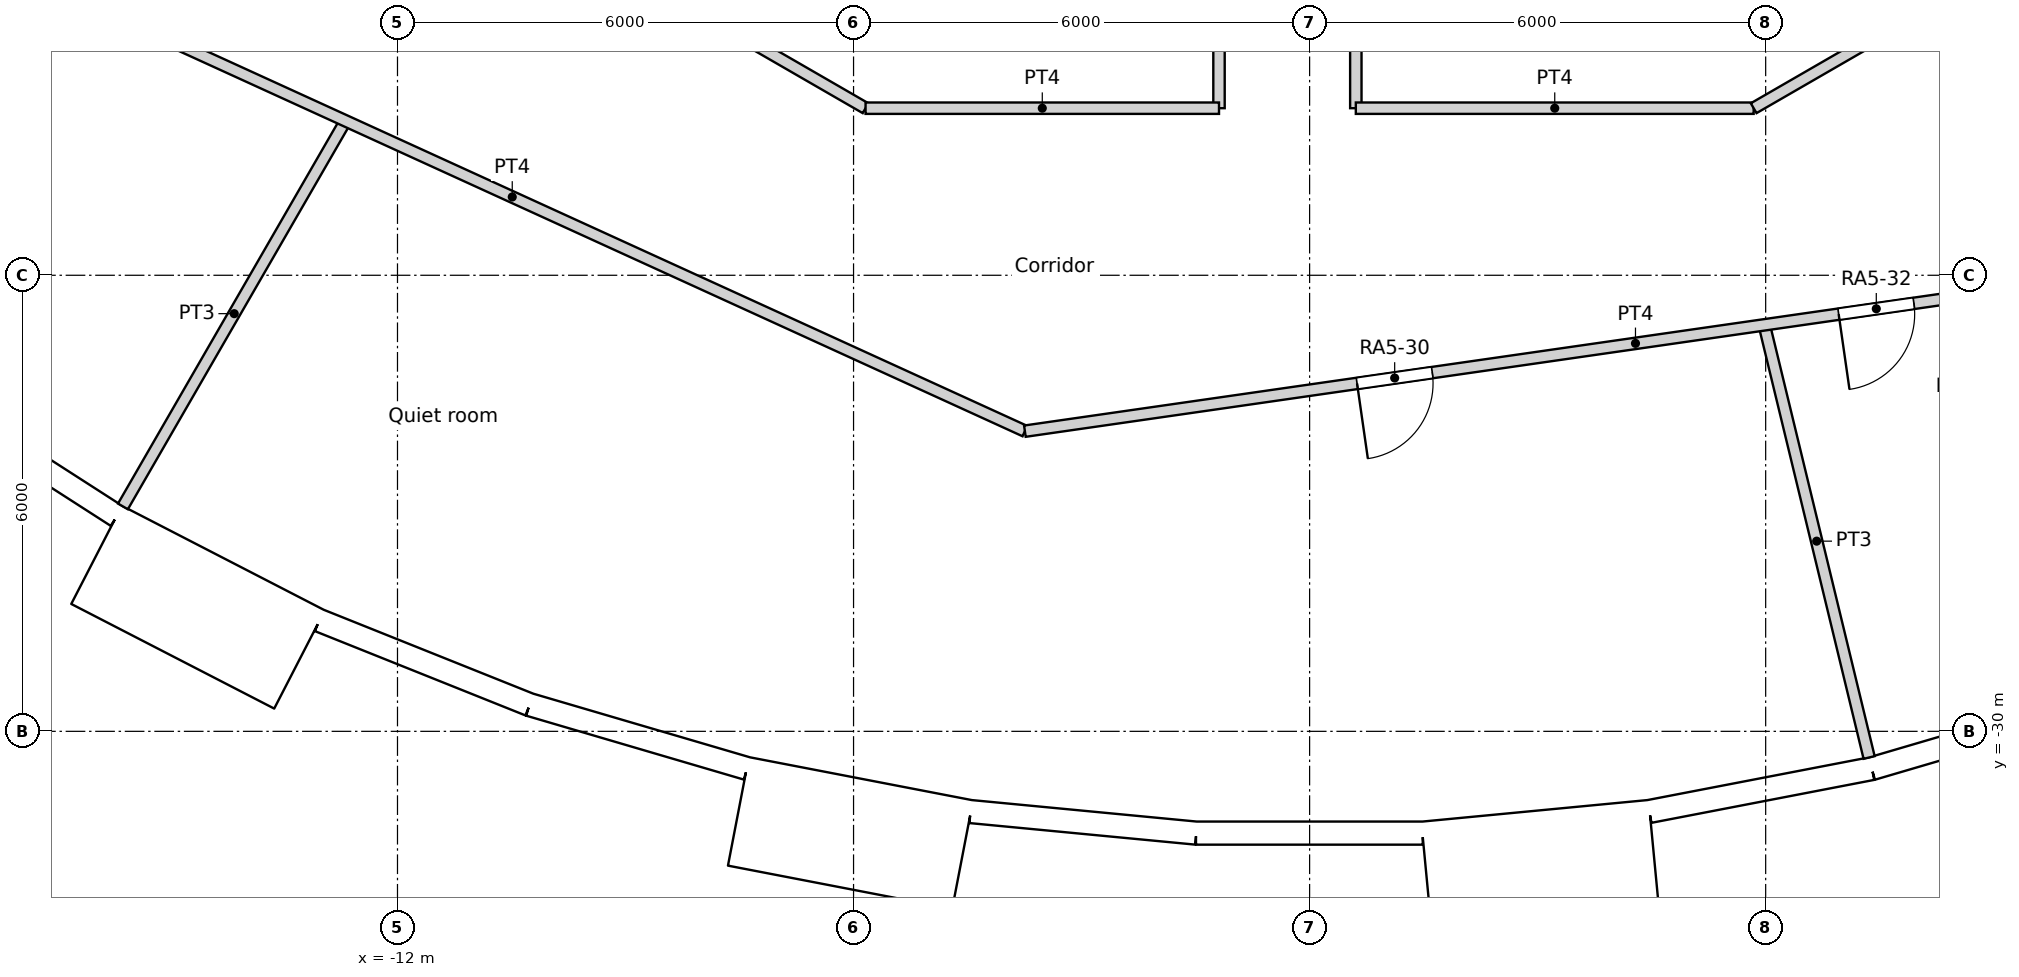
"""IFC4 building model, lengths in metres.
Left out: names, types, materials, properties, quantities, classifications, styles, units other than length and angle.
Written with IfcOpenShell. Run it as: python <this file> out.ifc"""

import sys

from ifc_helpers import new_model, si_unit, direction, frame, frame_2d, origin, origin_2d, place, context, subcontext, project, spatial, rectangle, circle, extrude, element, fill, save


model = new_model("IFC4")
c1 = context("Model", 3, precision=1e-05, world=origin(), true_north=direction((0.0, 1.0)))
c2 = subcontext(c1, "Body", "Model", "MODEL_VIEW")
j1 = project(units=[si_unit("LENGTHUNIT", "METRE"), si_unit("PLANEANGLEUNIT", "RADIAN")], contexts=[c1])
p1 = place(None, origin())
s1 = spatial("IfcSite", under=j1, at=p1, CompositionType="ELEMENT")
p2 = place(p1, origin())
s2 = spatial("IfcBuilding", under=s1, at=p2, CompositionType="ELEMENT")
p3 = place(p2, frame((0.0, 0.0, 71.4)))
s3 = spatial("IfcBuildingStorey", under=s2, at=p3, CompositionType="ELEMENT", Elevation=71.4)
for number, where, z_axis, x_axis in (
    (1, (-15.137, -26.219, 0.0), (0.0, 0.0, 1.0), (1.0, 0.0, 0.0)),
    (2, (-9.902, -28.61, 0.0), (0.0, 0.0, 1.0), (1.0, 0.0, 0.0)),
    (3, (-4.309, -29.966, 0.0), (0.0, 0.0, 1.0), (1.0, 0.0, 0.0)),
    (4, (1.44, -30.24, 0.0), (0.0, 0.0, 1.0), (1.0, 0.0, 0.0)),
    (5, (7.137, -29.421, 0.0), (0.0, 0.0, 1.0), (1.0, 0.0, 0.0)),
):
    element("IfcColumn", number, at=place(p3, frame(where, z_axis=z_axis, x_axis=x_axis)), inside=s3, PredefinedType="COLUMN", context=c2, shape_type="SweptSolid", body=[
        extrude(circle(Radius=0.6, at=origin_2d()), origin(), (0.0, 0.0, 1.0), 3.6),
    ])
for number, where, z_axis, x_axis in (
    (6, (-12.274, -21.259, 0.0), (0.0, 0.0, 1.0), (1.0, 0.0, 0.0)),
    (7, (-7.04, -23.516, 0.0), (0.0, 0.0, 1.0), (1.0, 0.0, 0.0)),
    (8, (-1.427, -24.506, 0.0), (0.0, 0.0, 1.0), (1.0, 0.0, 0.0)),
    (9, (4.263, -24.175, 0.0), (0.0, 0.0, 1.0), (1.0, 0.0, 0.0)),
):
    element("IfcColumn", number, at=place(p3, frame(where, z_axis=z_axis, x_axis=x_axis)), inside=s3, PredefinedType="COLUMN", context=c2, shape_type="SweptSolid", body=[
        extrude(circle(Radius=0.65, at=origin_2d()), origin(), (0.0, 0.0, 1.0), 3.6),
    ])
p4 = place(p3, frame((-18.199, -25.557, 0.0), z_axis=(0.0, 0.0, 1.0), x_axis=(0.841260995538, -0.54062920508, 0.0)))
e10 = element("IfcWall", 10, at=p4, inside=s3, PredefinedType="SOLIDWALL", context=c2, shape_type="SweptSolid", body=[
    extrude(rectangle(XDim=2.979, YDim=0.3, at=frame_2d((1.49, 0.0))), origin(), (0.0, 0.0, 1.0), 3.15),
])
p5 = place(p4, frame((1.49, 0.0, 1.55)))
e11 = element("IfcOpeningElement", 11, at=p5, cuts=e10, PredefinedType="OPENING", context=c2, shape_type="SweptSolid", body=[
    extrude(circle(Radius=0.9, at=origin_2d()), frame((0.0, 0.16, 0.0), z_axis=(0.0, -1.0, 0.0), x_axis=(1.0, 0.0, 0.0)), (0.0, 0.0, 1.0), 0.32),
])
p6 = place(p3, frame((-15.957, -27.679, -0.45), z_axis=(0.0, 0.0, 1.0), x_axis=(0.888858064689, -0.458182650083, 0.0)))
e12 = element("IfcWall", 12, at=p6, inside=s3, PredefinedType="ELEMENTEDWALL", context=c2, shape_type="SweptSolid", body=[
    extrude(rectangle(XDim=3.0, YDim=1.45, at=frame_2d((1.5, 0.0))), origin(), (0.0, 0.0, 1.0), 3.6),
])
p7 = place(p6, frame((1.5, 0.0, 2.0)))
e13 = element("IfcOpeningElement", 13, at=p7, cuts=e12, PredefinedType="OPENING", context=c2, shape_type="SweptSolid", body=[
    extrude(circle(Radius=0.9, at=origin_2d()), frame((0.0, 0.735, 0.0), z_axis=(0.0, -1.0, 0.0), x_axis=(1.0, 0.0, 0.0)), (0.0, 0.0, 1.0), 1.47),
])
p8 = place(p3, frame((-13.028, -28.542, 0.0), z_axis=(0.0, 0.0, 1.0), x_axis=(0.928374947, -0.371644935098, 0.0)))
e14 = element("IfcWall", 14, at=p8, inside=s3, PredefinedType="SOLIDWALL", context=c2, shape_type="SweptSolid", body=[
    extrude(rectangle(XDim=2.98, YDim=0.3, at=frame_2d((1.49, 0.0))), origin(), (0.0, 0.0, 1.0), 3.15),
])
p9 = place(p8, frame((1.49, 0.0, 1.55)))
e15 = element("IfcOpeningElement", 15, at=p9, cuts=e14, PredefinedType="OPENING", context=c2, shape_type="SweptSolid", body=[
    extrude(circle(Radius=0.9, at=origin_2d()), frame((0.0, 0.16, 0.0), z_axis=(0.0, -1.0, 0.0), x_axis=(1.0, 0.0, 0.0)), (0.0, 0.0, 1.0), 0.32),
])
p10 = place(p3, frame((-10.261, -29.649, 0.0), z_axis=(0.0, 0.0, 1.0), x_axis=(0.959501085144, -0.281704930036, 0.0)))
e16 = element("IfcWall", 16, at=p10, inside=s3, PredefinedType="SOLIDWALL", context=c2, shape_type="SweptSolid", body=[
    extrude(rectangle(XDim=2.979, YDim=0.3, at=frame_2d((1.49, 0.0))), origin(), (0.0, 0.0, 1.0), 3.15),
])
p11 = place(p10, frame((1.49, 0.0, 1.55)))
e17 = element("IfcOpeningElement", 17, at=p11, cuts=e16, PredefinedType="OPENING", context=c2, shape_type="SweptSolid", body=[
    extrude(circle(Radius=0.9, at=origin_2d()), frame((0.0, 0.16, 0.0), z_axis=(0.0, -1.0, 0.0), x_axis=(1.0, 0.0, 0.0)), (0.0, 0.0, 1.0), 0.32),
])
p12 = place(p3, frame((-7.513, -31.053, -0.45), z_axis=(0.0, 0.0, 1.0), x_axis=(0.981921602273, -0.189288052949, 0.0)))
e18 = element("IfcWall", 18, at=p12, inside=s3, PredefinedType="ELEMENTEDWALL", context=c2, shape_type="SweptSolid", body=[
    extrude(rectangle(XDim=3.0, YDim=1.45, at=frame_2d((1.5, 0.0))), origin(), (0.0, 0.0, 1.0), 3.6),
])
p13 = place(p12, frame((1.5, 0.0, 2.0)))
e19 = element("IfcOpeningElement", 19, at=p13, cuts=e18, PredefinedType="OPENING", context=c2, shape_type="SweptSolid", body=[
    extrude(circle(Radius=0.9, at=origin_2d()), frame((0.0, 0.735, 0.0), z_axis=(0.0, -1.0, 0.0), x_axis=(1.0, 0.0, 0.0)), (0.0, 0.0, 1.0), 1.47),
])
p14 = place(p3, frame((-4.459, -31.056, 0.0), z_axis=(0.0, 0.0, 1.0), x_axis=(0.995472611385, -0.095048829468, 0.0)))
e20 = element("IfcWall", 20, at=p14, inside=s3, PredefinedType="SOLIDWALL", context=c2, shape_type="SweptSolid", body=[
    extrude(rectangle(XDim=2.979, YDim=0.3, at=frame_2d((1.49, 0.0))), origin(), (0.0, 0.0, 1.0), 3.15),
])
p15 = place(p14, frame((1.49, 0.0, 1.55)))
e21 = element("IfcOpeningElement", 21, at=p15, cuts=e20, PredefinedType="OPENING", context=c2, shape_type="SweptSolid", body=[
    extrude(circle(Radius=0.9, at=origin_2d()), frame((0.0, 0.16, 0.0), z_axis=(0.0, -1.0, 0.0), x_axis=(1.0, 0.0, 0.0)), (0.0, 0.0, 1.0), 0.32),
])
p16 = place(p3, frame((-1.493, -31.339, 0.0), z_axis=(0.0, 0.0, 1.0), x_axis=(1.0, 0.0, 0.0)))
e22 = element("IfcWall", 22, at=p16, inside=s3, PredefinedType="SOLIDWALL", context=c2, shape_type="SweptSolid", body=[
    extrude(rectangle(XDim=2.98, YDim=0.3, at=frame_2d((1.49, 0.0))), origin(), (0.0, 0.0, 1.0), 3.15),
])
p17 = place(p16, frame((1.49, 0.0, 1.55)))
e23 = element("IfcOpeningElement", 23, at=p17, cuts=e22, PredefinedType="OPENING", context=c2, shape_type="SweptSolid", body=[
    extrude(circle(Radius=0.9, at=origin_2d()), frame((0.0, 0.16, 0.0), z_axis=(0.0, -1.0, 0.0), x_axis=(1.0, 0.0, 0.0)), (0.0, 0.0, 1.0), 0.32),
])
p18 = place(p3, frame((1.54, -31.912, -0.45), z_axis=(0.0, 0.0, 1.0), x_axis=(0.995472768558, 0.09504718333, 0.0)))
e24 = element("IfcWall", 24, at=p18, inside=s3, PredefinedType="ELEMENTEDWALL", context=c2, shape_type="SweptSolid", body=[
    extrude(rectangle(XDim=3.0, YDim=1.45, at=frame_2d((1.5, 0.0))), origin(), (0.0, 0.0, 1.0), 3.6),
])
p19 = place(p18, frame((1.5, 0.0, 2.0)))
e25 = element("IfcOpeningElement", 25, at=p19, cuts=e24, PredefinedType="OPENING", context=c2, shape_type="SweptSolid", body=[
    extrude(circle(Radius=0.9, at=origin_2d()), frame((0.0, 0.735, 0.0), z_axis=(0.0, -1.0, 0.0), x_axis=(1.0, 0.0, 0.0)), (0.0, 0.0, 1.0), 1.47),
])
p20 = place(p3, frame((4.471, -31.054, 0.0), z_axis=(0.0, 0.0, 1.0), x_axis=(0.981924535406, 0.189272836848, 0.0)))
e26 = element("IfcWall", 26, at=p20, inside=s3, PredefinedType="SOLIDWALL", context=c2, shape_type="SweptSolid", body=[
    extrude(rectangle(XDim=2.98, YDim=0.3, at=frame_2d((1.49, 0.0))), origin(), (0.0, 0.0, 1.0), 3.15),
])
p21 = place(p20, frame((1.49, 0.0, 1.55)))
e27 = element("IfcOpeningElement", 27, at=p21, cuts=e26, PredefinedType="OPENING", context=c2, shape_type="SweptSolid", body=[
    extrude(circle(Radius=0.9, at=origin_2d()), frame((0.0, 0.16, 0.0), z_axis=(0.0, -1.0, 0.0), x_axis=(1.0, 0.0, 0.0)), (0.0, 0.0, 1.0), 0.32),
])
p22 = place(p3, frame((7.397, -30.49, 0.0), z_axis=(0.0, 0.0, 1.0), x_axis=(0.959507586834, 0.28168278401, 0.0)))
e28 = element("IfcWall", 28, at=p22, inside=s3, PredefinedType="SOLIDWALL", context=c2, shape_type="SweptSolid", body=[
    extrude(rectangle(XDim=2.98, YDim=0.3, at=frame_2d((1.49, 0.0))), origin(), (0.0, 0.0, 1.0), 3.15),
])
p23 = place(p22, frame((1.49, 0.0, 1.55)))
e29 = element("IfcOpeningElement", 29, at=p23, cuts=e28, PredefinedType="OPENING", context=c2, shape_type="SweptSolid", body=[
    extrude(circle(Radius=0.9, at=origin_2d()), frame((0.0, 0.16, 0.0), z_axis=(0.0, -1.0, 0.0), x_axis=(1.0, 0.0, 0.0)), (0.0, 0.0, 1.0), 0.32),
])
p24 = place(p3, frame((-14.0, -17.092, 0.0), z_axis=(0.0, 0.0, 1.0), x_axis=(0.86602719091, -0.499996904595, 0.0)))
e30 = element("IfcWall", 30, at=p24, inside=s3, PredefinedType="PARTITIONING", context=c2, shape_type="SweptSolid", body=[
    extrude(rectangle(XDim=9.42, YDim=0.15, at=frame_2d((4.71, 0.0))), origin(), (0.0, 0.0, 1.0), 3.15),
])
p25 = place(p3, frame((-5.842, -21.802, 0.0), z_axis=(0.0, 0.0, 1.0), x_axis=(1.0, 0.0, 0.0)))
e31 = element("IfcWall", 31, at=p25, inside=s3, PredefinedType="PARTITIONING", context=c2, shape_type="SweptSolid", body=[
    extrude(rectangle(XDim=4.65, YDim=0.15, at=frame_2d((2.325, 0.0))), origin(), (0.0, 0.0, 1.0), 3.15),
])
p26 = place(p3, frame((-1.192, -21.802, 0.0), z_axis=(0.0, 0.0, 1.0), x_axis=(0.0, 1.0, 0.0)))
e32 = element("IfcWall", 32, at=p26, inside=s3, PredefinedType="PARTITIONING", context=c2, shape_type="SweptSolid", body=[
    extrude(rectangle(XDim=10.002, YDim=0.15, at=frame_2d((5.001, 0.0))), origin(), (0.0, 0.0, 1.0), 3.15),
])
p27 = place(p3, frame((0.608, -21.802, 0.0), z_axis=(0.0, 0.0, 1.0), x_axis=(0.0, 1.0, 0.0)))
e33 = element("IfcWall", 33, at=p27, inside=s3, PredefinedType="PARTITIONING", context=c2, shape_type="SweptSolid", body=[
    extrude(rectangle(XDim=10.002, YDim=0.15, at=frame_2d((5.001, 0.0))), origin(), (0.0, 0.0, 1.0), 3.15),
])
p28 = place(p27, frame((4.526, 0.0, 0.0)))
e34 = element("IfcOpeningElement", 34, at=p28, cuts=e33, PredefinedType="OPENING", context=c2, shape_type="SweptSolid", body=[
    extrude(rectangle(XDim=0.95, YDim=2.1, at=frame_2d((0.475, 1.05))), frame((0.0, 0.075, 0.0), z_axis=(0.0, -1.0, 0.0), x_axis=(1.0, 0.0, 0.0)), (0.0, 0.0, 1.0), 0.15),
])
p29 = place(p3, frame((0.608, -21.802, 0.0), z_axis=(0.0, 0.0, 1.0), x_axis=(1.0, 0.0, 0.0)))
e35 = element("IfcWall", 35, at=p29, inside=s3, PredefinedType="PARTITIONING", context=c2, shape_type="SweptSolid", body=[
    extrude(rectangle(XDim=5.234, YDim=0.15, at=frame_2d((2.617, 0.0))), origin(), (0.0, 0.0, 1.0), 3.15),
])
p30 = place(p3, frame((5.842, -21.802, 0.0), z_axis=(0.0, 0.0, 1.0), x_axis=(0.865983505205, 0.500072563448, 0.0)))
e36 = element("IfcWall", 36, at=p30, inside=s3, PredefinedType="PARTITIONING", context=c2, shape_type="SweptSolid", body=[
    extrude(rectangle(XDim=4.265, YDim=0.15, at=frame_2d((2.133, 0.0))), origin(), (0.0, 0.0, 1.0), 3.15),
])
p31 = place(p3, frame((-17.235, -19.89, 0.0), z_axis=(0.0, 0.0, 1.0), x_axis=(0.909645678785, -0.415385049163, 0.0)))
e37 = element("IfcWall", 37, at=p31, inside=s3, PredefinedType="PARTITIONING", context=c2, shape_type="SweptSolid", body=[
    extrude(rectangle(XDim=14.829, YDim=0.15, at=frame_2d((7.415, 0.0))), origin(), (0.0, 0.0, 1.0), 3.15),
])
p32 = place(p3, frame((-3.746, -26.051, 0.0), z_axis=(0.0, 0.0, 1.0), x_axis=(0.989823328782, 0.142301713967, 0.0)))
e38 = element("IfcWall", 38, at=p32, inside=s3, PredefinedType="PARTITIONING", context=c2, shape_type="SweptSolid", body=[
    extrude(rectangle(XDim=14.83, YDim=0.15, at=frame_2d((7.415, 0.0))), origin(), (0.0, 0.0, 1.0), 3.15),
])
p33 = place(p32, frame((4.415, 0.0, 0.0)))
e39 = element("IfcOpeningElement", 39, at=p33, cuts=e38, PredefinedType="OPENING", context=c2, shape_type="SweptSolid", body=[
    extrude(rectangle(XDim=1.0, YDim=2.04, at=frame_2d((0.5, 1.02))), frame((0.0, 0.075, 0.0), z_axis=(0.0, -1.0, 0.0), x_axis=(1.0, 0.0, 0.0)), (0.0, 0.0, 1.0), 0.15),
])
p34 = place(p32, frame((10.816, 0.0, 0.0)))
e40 = element("IfcOpeningElement", 40, at=p34, cuts=e38, PredefinedType="OPENING", context=c2, shape_type="SweptSolid", body=[
    extrude(rectangle(XDim=1.0, YDim=2.1, at=frame_2d((0.5, 1.05))), frame((0.0, 0.075, 0.0), z_axis=(0.0, -1.0, 0.0), x_axis=(1.0, 0.0, 0.0)), (0.0, 0.0, 1.0), 0.15),
])
p35 = place(p3, frame((-15.612, -27.041, 0.0), z_axis=(0.0, 0.0, 1.0), x_axis=(0.499954606878, 0.86605160993, 0.0)))
e41 = element("IfcWall", 41, at=p35, inside=s3, PredefinedType="PARTITIONING", context=c2, shape_type="SweptSolid", body=[
    extrude(rectangle(XDim=5.856, YDim=0.15, at=frame_2d((2.928, 0.0))), origin(), (0.0, 0.0, 1.0), 3.15),
])
p36 = place(p3, frame((5.981, -24.652, 0.0), z_axis=(0.0, 0.0, 1.0), x_axis=(0.235644168604, -0.971839403298, 0.0)))
e42 = element("IfcWall", 42, at=p36, inside=s3, PredefinedType="PARTITIONING", context=c2, shape_type="SweptSolid", body=[
    extrude(rectangle(XDim=5.857, YDim=0.15, at=frame_2d((2.928, 0.0))), origin(), (0.0, 0.0, 1.0), 3.15),
])
p37 = place(p5, origin())
e43 = element("IfcWindow", 43, at=p37, inside=s3, PartitioningType="SINGLE_PANEL", PredefinedType="WINDOW", context=c2, shape_type="SweptSolid", body=[
    extrude(circle(Radius=0.9, at=origin_2d()), frame((0.0, 0.12, 0.0), z_axis=(0.0, -1.0, 0.0), x_axis=(1.0, 0.0, 0.0)), (0.0, 0.0, 1.0), 0.1),
])
fill(e11, e43)
p38 = place(p7, origin())
e44 = element("IfcWindow", 44, at=p38, inside=s3, PartitioningType="SINGLE_PANEL", PredefinedType="WINDOW", context=c2, shape_type="SweptSolid", body=[
    extrude(circle(Radius=0.9, at=origin_2d()), frame((0.0, 0.695, 0.0), z_axis=(0.0, -1.0, 0.0), x_axis=(1.0, 0.0, 0.0)), (0.0, 0.0, 1.0), 0.1),
])
fill(e13, e44)
p39 = place(p9, origin())
e45 = element("IfcWindow", 45, at=p39, inside=s3, PartitioningType="SINGLE_PANEL", PredefinedType="WINDOW", context=c2, shape_type="SweptSolid", body=[
    extrude(circle(Radius=0.9, at=origin_2d()), frame((0.0, 0.12, 0.0), z_axis=(0.0, -1.0, 0.0), x_axis=(1.0, 0.0, 0.0)), (0.0, 0.0, 1.0), 0.1),
])
fill(e15, e45)
p40 = place(p11, origin())
e46 = element("IfcWindow", 46, at=p40, inside=s3, PartitioningType="SINGLE_PANEL", PredefinedType="WINDOW", context=c2, shape_type="SweptSolid", body=[
    extrude(circle(Radius=0.9, at=origin_2d()), frame((0.0, 0.12, 0.0), z_axis=(0.0, -1.0, 0.0), x_axis=(1.0, 0.0, 0.0)), (0.0, 0.0, 1.0), 0.1),
])
fill(e17, e46)
p41 = place(p13, origin())
e47 = element("IfcWindow", 47, at=p41, inside=s3, PartitioningType="SINGLE_PANEL", PredefinedType="WINDOW", context=c2, shape_type="SweptSolid", body=[
    extrude(circle(Radius=0.9, at=origin_2d()), frame((0.0, 0.695, 0.0), z_axis=(0.0, -1.0, 0.0), x_axis=(1.0, 0.0, 0.0)), (0.0, 0.0, 1.0), 0.1),
])
fill(e19, e47)
p42 = place(p15, origin())
e48 = element("IfcWindow", 48, at=p42, inside=s3, PartitioningType="SINGLE_PANEL", PredefinedType="WINDOW", context=c2, shape_type="SweptSolid", body=[
    extrude(circle(Radius=0.9, at=origin_2d()), frame((0.0, 0.12, 0.0), z_axis=(0.0, -1.0, 0.0), x_axis=(1.0, 0.0, 0.0)), (0.0, 0.0, 1.0), 0.1),
])
fill(e21, e48)
p43 = place(p17, origin())
e49 = element("IfcWindow", 49, at=p43, inside=s3, PartitioningType="SINGLE_PANEL", PredefinedType="WINDOW", context=c2, shape_type="SweptSolid", body=[
    extrude(circle(Radius=0.9, at=origin_2d()), frame((0.0, 0.12, 0.0), z_axis=(0.0, -1.0, 0.0), x_axis=(1.0, 0.0, 0.0)), (0.0, 0.0, 1.0), 0.1),
])
fill(e23, e49)
p44 = place(p19, origin())
e50 = element("IfcWindow", 50, at=p44, inside=s3, PartitioningType="SINGLE_PANEL", PredefinedType="WINDOW", context=c2, shape_type="SweptSolid", body=[
    extrude(circle(Radius=0.9, at=origin_2d()), frame((0.0, 0.695, 0.0), z_axis=(0.0, -1.0, 0.0), x_axis=(1.0, 0.0, 0.0)), (0.0, 0.0, 1.0), 0.1),
])
fill(e25, e50)
p45 = place(p21, origin())
e51 = element("IfcWindow", 51, at=p45, inside=s3, PartitioningType="SINGLE_PANEL", PredefinedType="WINDOW", context=c2, shape_type="SweptSolid", body=[
    extrude(circle(Radius=0.9, at=origin_2d()), frame((0.0, 0.12, 0.0), z_axis=(0.0, -1.0, 0.0), x_axis=(1.0, 0.0, 0.0)), (0.0, 0.0, 1.0), 0.1),
])
fill(e27, e51)
p46 = place(p23, origin())
e52 = element("IfcWindow", 52, at=p46, inside=s3, PartitioningType="SINGLE_PANEL", PredefinedType="WINDOW", context=c2, shape_type="SweptSolid", body=[
    extrude(circle(Radius=0.9, at=origin_2d()), frame((0.0, 0.12, 0.0), z_axis=(0.0, -1.0, 0.0), x_axis=(1.0, 0.0, 0.0)), (0.0, 0.0, 1.0), 0.1),
])
fill(e29, e52)
p47 = place(p33, origin())
e53 = element("IfcDoor", 53, at=p47, inside=s3, OperationType="SINGLE_SWING_RIGHT", PredefinedType="DOOR", context=c2, shape_type="SweptSolid", body=[
    extrude(rectangle(XDim=1.0, YDim=2.04, at=frame_2d((0.5, 1.02))), frame((0.0, 0.025, 0.0), z_axis=(0.0, -1.0, 0.0), x_axis=(1.0, 0.0, 0.0)), (0.0, 0.0, 1.0), 0.05),
])
fill(e39, e53)
p48 = place(p34, origin())
e54 = element("IfcDoor", 54, at=p48, inside=s3, OperationType="SINGLE_SWING_RIGHT", PredefinedType="DOOR", context=c2, shape_type="SweptSolid", body=[
    extrude(rectangle(XDim=1.0, YDim=2.1, at=frame_2d((0.5, 1.05))), frame((0.0, 0.025, 0.0), z_axis=(0.0, -1.0, 0.0), x_axis=(1.0, 0.0, 0.0)), (0.0, 0.0, 1.0), 0.05),
])
fill(e40, e54)
save(model, sys.argv[1])
